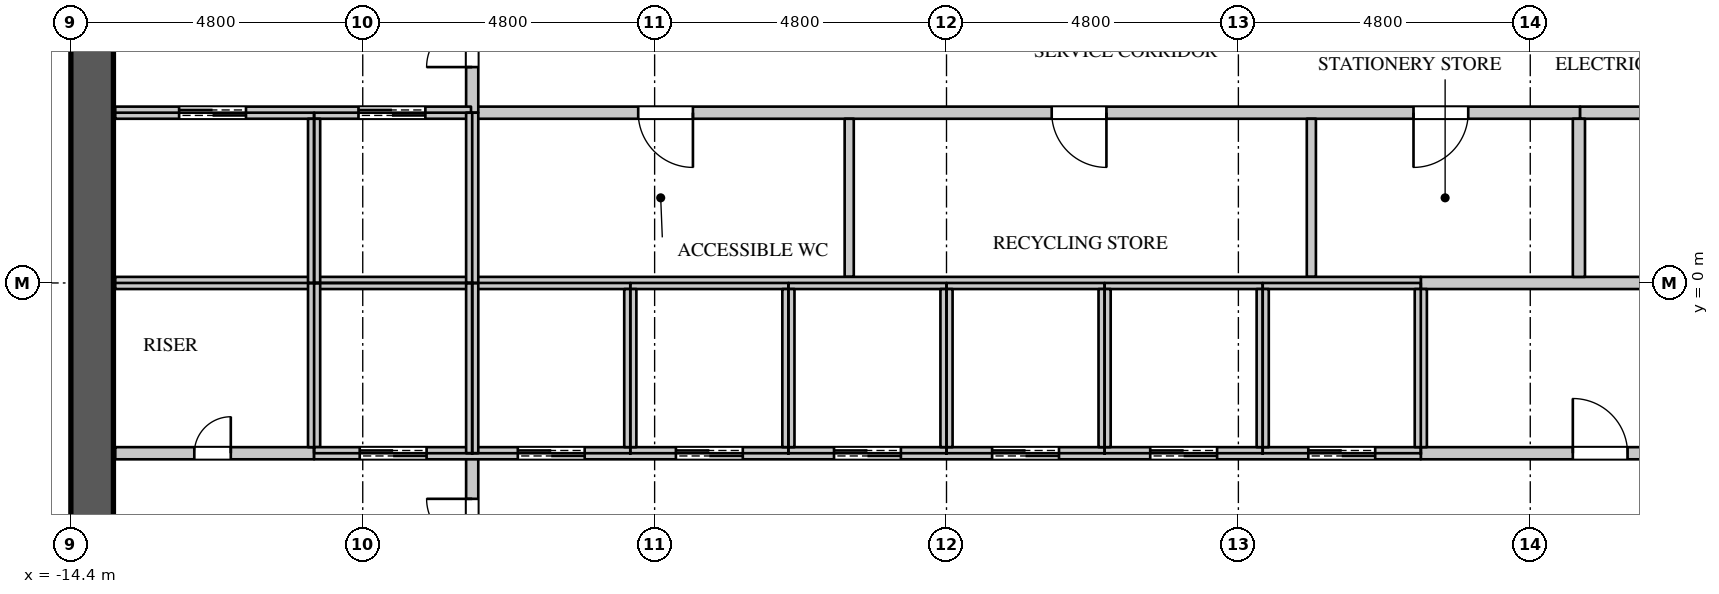
"""IFC4 building model, lengths in metres.
Left out: names, types, materials, properties, quantities, classifications, styles, units other than length and angle.
Written with IfcOpenShell. Run it as: python <this file> out.ifc"""

import sys

from ifc_helpers import new_model, si_unit, direction, frame, frame_2d, origin, place, context, subcontext, project, spatial, rectangle, extrude, element, fill, save


model = new_model("IFC4")
c1 = context("Model", 3, precision=1e-05, world=origin(), true_north=direction((0.0, 1.0)))
c2 = subcontext(c1, "Body", "Model", "MODEL_VIEW")
j1 = project(units=[si_unit("LENGTHUNIT", "METRE"), si_unit("PLANEANGLEUNIT", "RADIAN")], contexts=[c1])
p1 = place(None, origin())
s1 = spatial("IfcSite", under=j1, at=p1, CompositionType="ELEMENT")
p2 = place(p1, origin())
s2 = spatial("IfcBuilding", under=s1, at=p2, CompositionType="ELEMENT")
p3 = place(p2, frame((0.0, 0.0, 166.5)))
s3 = spatial("IfcBuildingStorey", under=s2, at=p3, CompositionType="ELEMENT", Elevation=166.5)
p4 = place(p3, frame((-14.05, -11.3, 0.0), z_axis=(0.0, 0.0, 1.0), x_axis=(0.0, 1.0, 0.0)))
e1 = element("IfcWall", 1, at=p4, inside=s3, PredefinedType="SHEAR", context=c2, shape_type="SweptSolid", body=[
    extrude(rectangle(XDim=22.6, YDim=0.7, at=frame_2d((11.3, 0.0))), origin(), (0.0, 0.0, 1.0), 4.2),
])
p5 = place(p4, frame((20.35, 0.0, 0.0)))
e2 = element("IfcOpeningElement", 2, at=p5, cuts=e1, PredefinedType="OPENING", context=c2, shape_type="SweptSolid", body=[
    extrude(rectangle(XDim=1.1, YDim=2.2, at=frame_2d((0.55, 1.1))), frame((0.0, 0.36, 0.0), z_axis=(0.0, -1.0, 0.0), x_axis=(1.0, 0.0, 0.0)), (0.0, 0.0, 1.0), 0.72),
])
p6 = place(p4, frame((1.15, 0.0, 0.0)))
e3 = element("IfcOpeningElement", 3, at=p6, cuts=e1, PredefinedType="OPENING", context=c2, shape_type="SweptSolid", body=[
    extrude(rectangle(XDim=1.1, YDim=2.2, at=frame_2d((0.55, 1.1))), frame((0.0, 0.36, 0.0), z_axis=(0.0, -1.0, 0.0), x_axis=(1.0, 0.0, 0.0)), (0.0, 0.0, 1.0), 0.72),
])
p7 = place(p4, frame((16.05, 0.0, 0.0)))
e4 = element("IfcOpeningElement", 4, at=p7, cuts=e1, PredefinedType="OPENING", context=c2, shape_type="SweptSolid", body=[
    extrude(rectangle(XDim=1.5, YDim=2.4, at=frame_2d((0.75, 1.2))), frame((0.0, 0.36, 0.0), z_axis=(0.0, -1.0, 0.0), x_axis=(1.0, 0.0, 0.0)), (0.0, 0.0, 1.0), 0.72),
])
p8 = place(p4, frame((5.05, 0.0, 0.0)))
e5 = element("IfcOpeningElement", 5, at=p8, cuts=e1, PredefinedType="OPENING", context=c2, shape_type="SweptSolid", body=[
    extrude(rectangle(XDim=1.5, YDim=2.4, at=frame_2d((0.75, 1.2))), frame((0.0, 0.36, 0.0), z_axis=(0.0, -1.0, 0.0), x_axis=(1.0, 0.0, 0.0)), (0.0, 0.0, 1.0), 0.72),
])
p9 = place(p3, frame((-7.82, 2.8, 0.0), z_axis=(0.0, 0.0, 1.0), x_axis=(1.0, 0.0, 0.0)))
e6 = element("IfcWall", 6, at=p9, inside=s3, PredefinedType="PARTITIONING", context=c2, shape_type="SweptSolid", body=[
    extrude(rectangle(XDim=18.24, YDim=0.2, at=frame_2d((9.12, 0.0))), origin(), (0.0, 0.0, 1.0), 3.95),
])
p10 = place(p9, frame((2.75, 0.0, 0.0)))
e7 = element("IfcOpeningElement", 7, at=p10, cuts=e6, PredefinedType="OPENING", context=c2, shape_type="SweptSolid", body=[
    extrude(rectangle(XDim=0.9, YDim=2.2, at=frame_2d((0.45, 1.1))), frame((0.0, 0.11, 0.0), z_axis=(0.0, -1.0, 0.0), x_axis=(1.0, 0.0, 0.0)), (0.0, 0.0, 1.0), 0.22),
])
p11 = place(p9, frame((9.55, 0.0, 0.0)))
e8 = element("IfcOpeningElement", 8, at=p11, cuts=e6, PredefinedType="OPENING", context=c2, shape_type="SweptSolid", body=[
    extrude(rectangle(XDim=0.9, YDim=2.2, at=frame_2d((0.45, 1.1))), frame((0.0, 0.11, 0.0), z_axis=(0.0, -1.0, 0.0), x_axis=(1.0, 0.0, 0.0)), (0.0, 0.0, 1.0), 0.22),
])
p12 = place(p9, frame((15.5, 0.0, 0.0)))
e9 = element("IfcOpeningElement", 9, at=p12, cuts=e6, PredefinedType="OPENING", context=c2, shape_type="SweptSolid", body=[
    extrude(rectangle(XDim=0.9, YDim=2.2, at=frame_2d((0.45, 1.1))), frame((0.0, 0.11, 0.0), z_axis=(0.0, -1.0, 0.0), x_axis=(1.0, 0.0, 0.0)), (0.0, 0.0, 1.0), 0.22),
])
p13 = place(p3, frame((-7.8, -5.8, 0.0), z_axis=(0.0, 0.0, 1.0), x_axis=(0.0, 1.0, 0.0)))
e10 = element("IfcWall", 10, at=p13, inside=s3, PredefinedType="PARTITIONING", context=c2, shape_type="SweptSolid", body=[
    extrude(rectangle(XDim=3.0, YDim=0.2, at=frame_2d((1.5, 0.0))), origin(), (0.0, 0.0, 1.0), 3.95),
])
p14 = place(p13, frame((0.75, 0.0, 0.0)))
e11 = element("IfcOpeningElement", 11, at=p14, cuts=e10, PredefinedType="OPENING", context=c2, shape_type="SweptSolid", body=[
    extrude(rectangle(XDim=1.5, YDim=2.4, at=frame_2d((0.75, 1.2))), frame((0.0, 0.11, 0.0), z_axis=(0.0, -1.0, 0.0), x_axis=(1.0, 0.0, 0.0)), (0.0, 0.0, 1.0), 0.22),
])
p15 = place(p3, frame((-7.8, 2.8, 0.0), z_axis=(0.0, 0.0, 1.0), x_axis=(0.0, 1.0, 0.0)))
e12 = element("IfcWall", 12, at=p15, inside=s3, PredefinedType="PARTITIONING", context=c2, shape_type="SweptSolid", body=[
    extrude(rectangle(XDim=5.275, YDim=0.2, at=frame_2d((2.637, 0.0))), origin(), (0.0, 0.0, 1.0), 3.95),
])
p16 = place(p15, frame((0.75, 0.0, 0.0)))
e13 = element("IfcOpeningElement", 13, at=p16, cuts=e12, PredefinedType="OPENING", context=c2, shape_type="SweptSolid", body=[
    extrude(rectangle(XDim=1.5, YDim=2.4, at=frame_2d((0.75, 1.2))), frame((0.0, 0.11, 0.0), z_axis=(0.0, -1.0, 0.0), x_axis=(1.0, 0.0, 0.0)), (0.0, 0.0, 1.0), 0.22),
])
for number, where, z_axis, x_axis in (
    (14, (-1.6, 0.1, 0.0), (0.0, 0.0, 1.0), (0.0, 1.0, 0.0)),
    (15, (6.0, 0.1, 0.0), (0.0, 0.0, 1.0), (0.0, 1.0, 0.0)),
):
    element("IfcWall", number, at=place(p3, frame(where, z_axis=z_axis, x_axis=x_axis)), inside=s3, PredefinedType="PARTITIONING", context=c2, shape_type="SweptSolid", body=[
        extrude(rectangle(XDim=2.6, YDim=0.15, at=frame_2d((1.3, 0.0))), origin(), (0.0, 0.0, 1.0), 3.95),
    ])
p17 = place(p3, frame((-13.67, -2.8, 0.0), z_axis=(0.0, 0.0, 1.0), x_axis=(1.0, 0.0, 0.0)))
e16 = element("IfcWall", 16, at=p17, inside=s3, PredefinedType="PARTITIONING", context=c2, shape_type="SweptSolid", body=[
    extrude(rectangle(XDim=3.27, YDim=0.2, at=frame_2d((1.635, 0.0))), origin(), (0.0, 0.0, 1.0), 3.95),
])
p18 = place(p17, frame((1.3, 0.0, 0.0)))
e17 = element("IfcOpeningElement", 17, at=p18, cuts=e16, PredefinedType="OPENING", context=c2, shape_type="SweptSolid", body=[
    extrude(rectangle(XDim=0.6, YDim=2.0, at=frame_2d((0.3, 1.0))), frame((0.0, 0.11, 0.0), z_axis=(0.0, -1.0, 0.0), x_axis=(1.0, 0.0, 0.0)), (0.0, 0.0, 1.0), 0.22),
])
p19 = place(p3, frame((7.8, -2.8, 0.0), z_axis=(0.0, 0.0, 1.0), x_axis=(1.0, 0.0, 0.0)))
e18 = element("IfcWall", 18, at=p19, inside=s3, PredefinedType="PARTITIONING", context=c2, shape_type="SweptSolid", body=[
    extrude(rectangle(XDim=5.87, YDim=0.2, at=frame_2d((2.935, 0.0))), origin(), (0.0, 0.0, 1.0), 3.95),
])
p20 = place(p19, frame((2.5, 0.0, 0.0)))
e19 = element("IfcOpeningElement", 19, at=p20, cuts=e18, PredefinedType="OPENING", context=c2, shape_type="SweptSolid", body=[
    extrude(rectangle(XDim=0.9, YDim=2.2, at=frame_2d((0.45, 1.1))), frame((0.0, 0.11, 0.0), z_axis=(0.0, -1.0, 0.0), x_axis=(1.0, 0.0, 0.0)), (0.0, 0.0, 1.0), 0.22),
])
p21 = place(p3, frame((7.8, 0.0, 0.0), z_axis=(0.0, 0.0, 1.0), x_axis=(1.0, 0.0, 0.0)))
e20 = element("IfcWall", 20, at=p21, inside=s3, PredefinedType="PARTITIONING", context=c2, shape_type="SweptSolid", body=[
    extrude(rectangle(XDim=5.87, YDim=0.2, at=frame_2d((2.935, 0.0))), origin(), (0.0, 0.0, 1.0), 3.95),
])
p22 = place(p3, frame((10.42, 2.8, 0.0), z_axis=(0.0, 0.0, 1.0), x_axis=(1.0, 0.0, 0.0)))
e21 = element("IfcWall", 21, at=p22, inside=s3, PredefinedType="PARTITIONING", context=c2, shape_type="SweptSolid", body=[
    extrude(rectangle(XDim=3.25, YDim=0.2, at=frame_2d((1.625, 0.0))), origin(), (0.0, 0.0, 1.0), 3.95),
])
p23 = place(p22, frame((1.3, 0.0, 0.0)))
e22 = element("IfcOpeningElement", 22, at=p23, cuts=e21, PredefinedType="OPENING", context=c2, shape_type="SweptSolid", body=[
    extrude(rectangle(XDim=0.6, YDim=2.0, at=frame_2d((0.3, 1.0))), frame((0.0, 0.11, 0.0), z_axis=(0.0, -1.0, 0.0), x_axis=(1.0, 0.0, 0.0)), (0.0, 0.0, 1.0), 0.22),
])
p24 = place(p3, frame((10.4, 0.1, 0.0), z_axis=(0.0, 0.0, 1.0), x_axis=(0.0, 1.0, 0.0)))
e23 = element("IfcWall", 23, at=p24, inside=s3, PredefinedType="PARTITIONING", context=c2, shape_type="SweptSolid", body=[
    extrude(rectangle(XDim=2.6, YDim=0.2, at=frame_2d((1.3, 0.0))), origin(), (0.0, 0.0, 1.0), 3.95),
])
p25 = place(p3, frame((-13.67, 0.0, 0.0), z_axis=(0.0, 0.0, 1.0), x_axis=(1.0, 0.0, 0.0)))
e24 = element("IfcWall", 24, at=p25, inside=s3, PredefinedType="PARTITIONING", context=c2, shape_type="SweptSolid", body=[
    extrude(rectangle(XDim=21.47, YDim=0.2, at=frame_2d((10.735, 0.0))), origin(), (0.0, 0.0, 1.0), 3.95),
])
p26 = place(p3, frame((-13.67, 2.8, 0.0), z_axis=(0.0, 0.0, 1.0), x_axis=(1.0, 0.0, 0.0)))
e25 = element("IfcWall", 25, at=p26, inside=s3, PredefinedType="PARTITIONING", context=c2, shape_type="SweptSolid", body=[
    extrude(rectangle(XDim=5.85, YDim=0.2, at=frame_2d((2.925, 0.0))), origin(), (0.0, 0.0, 1.0), 3.95),
])
p27 = place(p26, frame((1.05, 0.0, 0.0)))
e26 = element("IfcOpeningElement", 26, at=p27, cuts=e25, PredefinedType="OPENING", context=c2, shape_type="SweptSolid", body=[
    extrude(rectangle(XDim=1.1, YDim=2.2, at=frame_2d((0.55, 1.1))), frame((0.0, 0.11, 0.0), z_axis=(0.0, -1.0, 0.0), x_axis=(1.0, 0.0, 0.0)), (0.0, 0.0, 1.0), 0.22),
])
p28 = place(p26, frame((4.0, 0.0, 0.0)))
e27 = element("IfcOpeningElement", 27, at=p28, cuts=e25, PredefinedType="OPENING", context=c2, shape_type="SweptSolid", body=[
    extrude(rectangle(XDim=1.1, YDim=2.2, at=frame_2d((0.55, 1.1))), frame((0.0, 0.11, 0.0), z_axis=(0.0, -1.0, 0.0), x_axis=(1.0, 0.0, 0.0)), (0.0, 0.0, 1.0), 0.22),
])
p29 = place(p3, frame((-10.4, -2.7, 0.0), z_axis=(0.0, 0.0, 1.0), x_axis=(0.0, 1.0, 0.0)))
e28 = element("IfcWall", 28, at=p29, inside=s3, PredefinedType="PARTITIONING", context=c2, shape_type="SweptSolid", body=[
    extrude(rectangle(XDim=2.7, YDim=0.2, at=frame_2d((1.35, 0.0))), origin(), (0.0, 0.0, 1.0), 3.95),
])
p30 = place(p3, frame((-10.4, -2.8, 0.0), z_axis=(0.0, 0.0, 1.0), x_axis=(1.0, 0.0, 0.0)))
e29 = element("IfcWall", 29, at=p30, inside=s3, PredefinedType="PARTITIONING", context=c2, shape_type="SweptSolid", body=[
    extrude(rectangle(XDim=18.2, YDim=0.2, at=frame_2d((9.1, 0.0))), origin(), (0.0, 0.0, 1.0), 3.95),
])
p31 = place(p30, frame((0.75, 0.0, 0.0)))
e30 = element("IfcOpeningElement", 30, at=p31, cuts=e29, PredefinedType="OPENING", context=c2, shape_type="SweptSolid", body=[
    extrude(rectangle(XDim=1.1, YDim=2.2, at=frame_2d((0.55, 1.1))), frame((0.0, 0.11, 0.0), z_axis=(0.0, -1.0, 0.0), x_axis=(1.0, 0.0, 0.0)), (0.0, 0.0, 1.0), 0.22),
])
p32 = place(p30, frame((3.35, 0.0, 0.0)))
e31 = element("IfcOpeningElement", 31, at=p32, cuts=e29, PredefinedType="OPENING", context=c2, shape_type="SweptSolid", body=[
    extrude(rectangle(XDim=1.1, YDim=2.2, at=frame_2d((0.55, 1.1))), frame((0.0, 0.11, 0.0), z_axis=(0.0, -1.0, 0.0), x_axis=(1.0, 0.0, 0.0)), (0.0, 0.0, 1.0), 0.22),
])
p33 = place(p30, frame((5.95, 0.0, 0.0)))
e32 = element("IfcOpeningElement", 32, at=p33, cuts=e29, PredefinedType="OPENING", context=c2, shape_type="SweptSolid", body=[
    extrude(rectangle(XDim=1.1, YDim=2.2, at=frame_2d((0.55, 1.1))), frame((0.0, 0.11, 0.0), z_axis=(0.0, -1.0, 0.0), x_axis=(1.0, 0.0, 0.0)), (0.0, 0.0, 1.0), 0.22),
])
p34 = place(p30, frame((8.55, 0.0, 0.0)))
e33 = element("IfcOpeningElement", 33, at=p34, cuts=e29, PredefinedType="OPENING", context=c2, shape_type="SweptSolid", body=[
    extrude(rectangle(XDim=1.1, YDim=2.2, at=frame_2d((0.55, 1.1))), frame((0.0, 0.11, 0.0), z_axis=(0.0, -1.0, 0.0), x_axis=(1.0, 0.0, 0.0)), (0.0, 0.0, 1.0), 0.22),
])
p35 = place(p30, frame((11.15, 0.0, 0.0)))
e34 = element("IfcOpeningElement", 34, at=p35, cuts=e29, PredefinedType="OPENING", context=c2, shape_type="SweptSolid", body=[
    extrude(rectangle(XDim=1.1, YDim=2.2, at=frame_2d((0.55, 1.1))), frame((0.0, 0.11, 0.0), z_axis=(0.0, -1.0, 0.0), x_axis=(1.0, 0.0, 0.0)), (0.0, 0.0, 1.0), 0.22),
])
p36 = place(p30, frame((13.75, 0.0, 0.0)))
e35 = element("IfcOpeningElement", 35, at=p36, cuts=e29, PredefinedType="OPENING", context=c2, shape_type="SweptSolid", body=[
    extrude(rectangle(XDim=1.1, YDim=2.2, at=frame_2d((0.55, 1.1))), frame((0.0, 0.11, 0.0), z_axis=(0.0, -1.0, 0.0), x_axis=(1.0, 0.0, 0.0)), (0.0, 0.0, 1.0), 0.22),
])
p37 = place(p30, frame((16.35, 0.0, 0.0)))
e36 = element("IfcOpeningElement", 36, at=p37, cuts=e29, PredefinedType="OPENING", context=c2, shape_type="SweptSolid", body=[
    extrude(rectangle(XDim=1.1, YDim=2.2, at=frame_2d((0.55, 1.1))), frame((0.0, 0.11, 0.0), z_axis=(0.0, -1.0, 0.0), x_axis=(1.0, 0.0, 0.0)), (0.0, 0.0, 1.0), 0.22),
])
p38 = place(p3, frame((-10.4, 0.0, 0.0), z_axis=(0.0, 0.0, 1.0), x_axis=(0.0, 1.0, 0.0)))
e37 = element("IfcWall", 37, at=p38, inside=s3, PredefinedType="PARTITIONING", context=c2, shape_type="SweptSolid", body=[
    extrude(rectangle(XDim=2.7, YDim=0.2, at=frame_2d((1.35, 0.0))), origin(), (0.0, 0.0, 1.0), 3.95),
])
for number, where, z_axis, x_axis in (
    (38, (-7.8, -2.8, 0.0), (0.0, 0.0, 1.0), (0.0, 1.0, 0.0)),
    (39, (-7.8, 0.0, 0.0), (0.0, 0.0, 1.0), (0.0, 1.0, 0.0)),
):
    element("IfcWall", number, at=place(p3, frame(where, z_axis=z_axis, x_axis=x_axis)), inside=s3, PredefinedType="PARTITIONING", context=c2, shape_type="SweptSolid", body=[
        extrude(rectangle(XDim=2.8, YDim=0.2, at=frame_2d((1.4, 0.0))), origin(), (0.0, 0.0, 1.0), 3.95),
    ])
for number, where, z_axis, x_axis in (
    (40, (-5.2, -2.7, 0.0), (0.0, 0.0, 1.0), (0.0, 1.0, 0.0)),
    (41, (-2.6, -2.7, 0.0), (0.0, 0.0, 1.0), (0.0, 1.0, 0.0)),
    (42, (0.0, -2.7, 0.0), (0.0, 0.0, 1.0), (0.0, 1.0, 0.0)),
    (43, (2.6, -2.7, 0.0), (0.0, 0.0, 1.0), (0.0, 1.0, 0.0)),
    (44, (5.2, -2.7, 0.0), (0.0, 0.0, 1.0), (0.0, 1.0, 0.0)),
    (45, (7.8, -2.7, 0.0), (0.0, 0.0, 1.0), (0.0, 1.0, 0.0)),
):
    element("IfcWall", number, at=place(p3, frame(where, z_axis=z_axis, x_axis=x_axis)), inside=s3, PredefinedType="PARTITIONING", context=c2, shape_type="SweptSolid", body=[
        extrude(rectangle(XDim=2.6, YDim=0.2, at=frame_2d((1.3, 0.0))), origin(), (0.0, 0.0, 1.0), 3.95),
    ])
p39 = place(p18, origin())
e46 = element("IfcDoor", 46, at=p39, inside=s3, OperationType="SINGLE_SWING_RIGHT", PredefinedType="DOOR", context=c2, shape_type="SweptSolid", body=[
    extrude(rectangle(XDim=0.6, YDim=2.0, at=frame_2d((0.3, 1.0))), frame((0.0, 0.025, 0.0), z_axis=(0.0, -1.0, 0.0), x_axis=(1.0, 0.0, 0.0)), (0.0, 0.0, 1.0), 0.05),
])
fill(e17, e46)
p40 = place(p20, origin())
e47 = element("IfcDoor", 47, at=p40, inside=s3, OperationType="SINGLE_SWING_LEFT", PredefinedType="DOOR", context=c2, shape_type="SweptSolid", body=[
    extrude(rectangle(XDim=0.9, YDim=2.2, at=frame_2d((0.45, 1.1))), frame((0.0, 0.025, 0.0), z_axis=(0.0, -1.0, 0.0), x_axis=(1.0, 0.0, 0.0)), (0.0, 0.0, 1.0), 0.05),
])
fill(e19, e47)
p41 = place(p10, origin())
e48 = element("IfcDoor", 48, at=p41, inside=s3, OperationType="SINGLE_SWING_LEFT", PredefinedType="DOOR", context=c2, shape_type="SweptSolid", body=[
    extrude(rectangle(XDim=0.9, YDim=2.2, at=frame_2d((0.45, 1.1))), frame((0.0, 0.025, 0.0), z_axis=(0.0, -1.0, 0.0), x_axis=(1.0, 0.0, 0.0)), (0.0, 0.0, 1.0), 0.05),
])
fill(e7, e48)
p42 = place(p11, origin())
e49 = element("IfcDoor", 49, at=p42, inside=s3, OperationType="SINGLE_SWING_LEFT", PredefinedType="DOOR", context=c2, shape_type="SweptSolid", body=[
    extrude(rectangle(XDim=0.9, YDim=2.2, at=frame_2d((0.45, 1.1))), frame((0.0, 0.025, 0.0), z_axis=(0.0, -1.0, 0.0), x_axis=(1.0, 0.0, 0.0)), (0.0, 0.0, 1.0), 0.05),
])
fill(e8, e49)
p43 = place(p12, origin())
e50 = element("IfcDoor", 50, at=p43, inside=s3, OperationType="SINGLE_SWING_RIGHT", PredefinedType="DOOR", context=c2, shape_type="SweptSolid", body=[
    extrude(rectangle(XDim=0.9, YDim=2.2, at=frame_2d((0.45, 1.1))), frame((0.0, 0.025, 0.0), z_axis=(0.0, -1.0, 0.0), x_axis=(1.0, 0.0, 0.0)), (0.0, 0.0, 1.0), 0.05),
])
fill(e9, e50)
p44 = place(p27, origin())
e51 = element("IfcDoor", 51, at=p44, inside=s3, OperationType="DOUBLE_DOOR_SLIDING", PredefinedType="DOOR", context=c2, shape_type="SweptSolid", body=[
    extrude(rectangle(XDim=1.1, YDim=2.2, at=frame_2d((0.55, 1.1))), frame((0.0, 0.025, 0.0), z_axis=(0.0, -1.0, 0.0), x_axis=(1.0, 0.0, 0.0)), (0.0, 0.0, 1.0), 0.05),
])
fill(e26, e51)
p45 = place(p28, origin())
e52 = element("IfcDoor", 52, at=p45, inside=s3, OperationType="DOUBLE_DOOR_SLIDING", PredefinedType="DOOR", context=c2, shape_type="SweptSolid", body=[
    extrude(rectangle(XDim=1.1, YDim=2.2, at=frame_2d((0.55, 1.1))), frame((0.0, 0.025, 0.0), z_axis=(0.0, -1.0, 0.0), x_axis=(1.0, 0.0, 0.0)), (0.0, 0.0, 1.0), 0.05),
])
fill(e27, e52)
p46 = place(p31, origin())
e53 = element("IfcDoor", 53, at=p46, inside=s3, OperationType="DOUBLE_DOOR_SLIDING", PredefinedType="DOOR", context=c2, shape_type="SweptSolid", body=[
    extrude(rectangle(XDim=1.1, YDim=2.2, at=frame_2d((0.55, 1.1))), frame((0.0, 0.025, 0.0), z_axis=(0.0, -1.0, 0.0), x_axis=(1.0, 0.0, 0.0)), (0.0, 0.0, 1.0), 0.05),
])
fill(e30, e53)
p47 = place(p32, origin())
e54 = element("IfcDoor", 54, at=p47, inside=s3, OperationType="DOUBLE_DOOR_SLIDING", PredefinedType="DOOR", context=c2, shape_type="SweptSolid", body=[
    extrude(rectangle(XDim=1.1, YDim=2.2, at=frame_2d((0.55, 1.1))), frame((0.0, 0.025, 0.0), z_axis=(0.0, -1.0, 0.0), x_axis=(1.0, 0.0, 0.0)), (0.0, 0.0, 1.0), 0.05),
])
fill(e31, e54)
p48 = place(p33, origin())
e55 = element("IfcDoor", 55, at=p48, inside=s3, OperationType="DOUBLE_DOOR_SLIDING", PredefinedType="DOOR", context=c2, shape_type="SweptSolid", body=[
    extrude(rectangle(XDim=1.1, YDim=2.2, at=frame_2d((0.55, 1.1))), frame((0.0, 0.025, 0.0), z_axis=(0.0, -1.0, 0.0), x_axis=(1.0, 0.0, 0.0)), (0.0, 0.0, 1.0), 0.05),
])
fill(e32, e55)
p49 = place(p34, origin())
e56 = element("IfcDoor", 56, at=p49, inside=s3, OperationType="DOUBLE_DOOR_SLIDING", PredefinedType="DOOR", context=c2, shape_type="SweptSolid", body=[
    extrude(rectangle(XDim=1.1, YDim=2.2, at=frame_2d((0.55, 1.1))), frame((0.0, 0.025, 0.0), z_axis=(0.0, -1.0, 0.0), x_axis=(1.0, 0.0, 0.0)), (0.0, 0.0, 1.0), 0.05),
])
fill(e33, e56)
p50 = place(p35, origin())
e57 = element("IfcDoor", 57, at=p50, inside=s3, OperationType="DOUBLE_DOOR_SLIDING", PredefinedType="DOOR", context=c2, shape_type="SweptSolid", body=[
    extrude(rectangle(XDim=1.1, YDim=2.2, at=frame_2d((0.55, 1.1))), frame((0.0, 0.025, 0.0), z_axis=(0.0, -1.0, 0.0), x_axis=(1.0, 0.0, 0.0)), (0.0, 0.0, 1.0), 0.05),
])
fill(e34, e57)
p51 = place(p36, origin())
e58 = element("IfcDoor", 58, at=p51, inside=s3, OperationType="DOUBLE_DOOR_SLIDING", PredefinedType="DOOR", context=c2, shape_type="SweptSolid", body=[
    extrude(rectangle(XDim=1.1, YDim=2.2, at=frame_2d((0.55, 1.1))), frame((0.0, 0.025, 0.0), z_axis=(0.0, -1.0, 0.0), x_axis=(1.0, 0.0, 0.0)), (0.0, 0.0, 1.0), 0.05),
])
fill(e35, e58)
p52 = place(p37, origin())
e59 = element("IfcDoor", 59, at=p52, inside=s3, OperationType="DOUBLE_DOOR_SLIDING", PredefinedType="DOOR", context=c2, shape_type="SweptSolid", body=[
    extrude(rectangle(XDim=1.1, YDim=2.2, at=frame_2d((0.55, 1.1))), frame((0.0, 0.025, 0.0), z_axis=(0.0, -1.0, 0.0), x_axis=(1.0, 0.0, 0.0)), (0.0, 0.0, 1.0), 0.05),
])
fill(e36, e59)
p53 = place(p16, origin())
e60 = element("IfcDoor", 60, at=p53, inside=s3, OperationType="DOUBLE_DOOR_SINGLE_SWING", PredefinedType="DOOR", context=c2, shape_type="SweptSolid", body=[
    extrude(rectangle(XDim=1.5, YDim=2.4, at=frame_2d((0.75, 1.2))), frame((0.0, 0.025, 0.0), z_axis=(0.0, -1.0, 0.0), x_axis=(1.0, 0.0, 0.0)), (0.0, 0.0, 1.0), 0.05),
])
fill(e13, e60)
p54 = place(p14, origin())
e61 = element("IfcDoor", 61, at=p54, inside=s3, OperationType="DOUBLE_DOOR_SINGLE_SWING", PredefinedType="DOOR", context=c2, shape_type="SweptSolid", body=[
    extrude(rectangle(XDim=1.5, YDim=2.4, at=frame_2d((0.75, 1.2))), frame((0.0, 0.025, 0.0), z_axis=(0.0, -1.0, 0.0), x_axis=(1.0, 0.0, 0.0)), (0.0, 0.0, 1.0), 0.05),
])
fill(e11, e61)
save(model, sys.argv[1])
